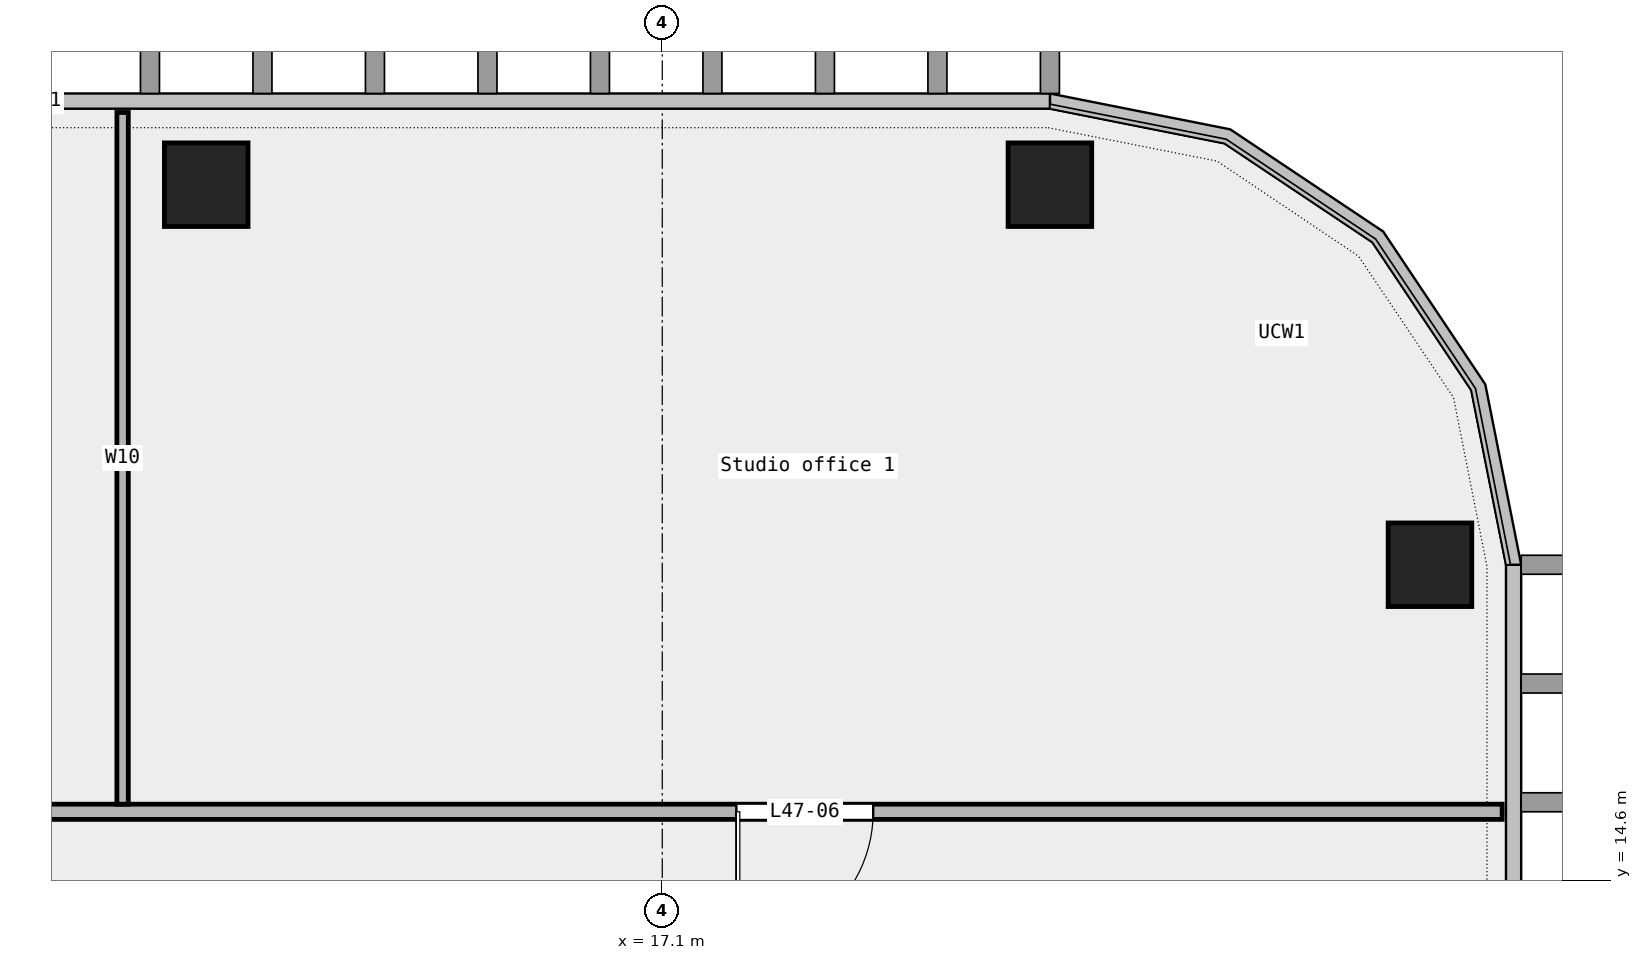
"""IFC4 building model, lengths in metres.
Left out: names, types, materials, properties, quantities, classifications, styles, units other than length and angle.
Written with IfcOpenShell. Run it as: python <this file> out.ifc"""

import sys

from ifc_helpers import new_model, si_unit, direction, frame, frame_2d, origin, origin_2d, place, context, subcontext, project, spatial, rectangle, extrude, element, fill, save


model = new_model("IFC4")
c1 = context("Model", 3, precision=1e-05, world=origin(), true_north=direction((0.0, 1.0)))
c2 = subcontext(c1, "Body", "Model", "MODEL_VIEW")
j1 = project(units=[si_unit("LENGTHUNIT", "METRE"), si_unit("PLANEANGLEUNIT", "RADIAN")], contexts=[c1])
p1 = place(None, origin())
s1 = spatial("IfcSite", under=j1, at=p1, CompositionType="ELEMENT")
p2 = place(p1, origin())
s2 = spatial("IfcBuilding", under=s1, at=p2, CompositionType="ELEMENT")
p3 = place(p2, frame((0.0, 0.0, 223.0)))
s3 = spatial("IfcBuildingStorey", under=s2, at=p3, CompositionType="ELEMENT", Elevation=223.0)
for number, where, z_axis, x_axis in (
    (1, (27.2, 18.75, 0.0), (0.0, 0.0, 1.0), (1.0, 0.0, 0.0)),
    (2, (22.2, 23.75, 0.0), (0.0, 0.0, 1.0), (1.0, 0.0, 0.0)),
    (3, (11.1, 23.75, 0.0), (0.0, 0.0, 1.0), (1.0, 0.0, 0.0)),
):
    element("IfcColumn", number, at=place(p3, frame(where, z_axis=z_axis, x_axis=x_axis)), inside=s3, PredefinedType="COLUMN", context=c2, shape_type="SweptSolid", body=[
        extrude(rectangle(XDim=1.1, YDim=1.1, at=origin_2d()), origin(), (0.0, 0.0, 1.0), 3.6),
    ])
p4 = place(p3, frame((-28.15, 15.5, 0.0), z_axis=(0.0, 0.0, 1.0), x_axis=(1.0, 0.0, 0.0)))
e4 = element("IfcWall", 4, at=p4, inside=s3, PredefinedType="PARTITIONING", context=c2, shape_type="SweptSolid", body=[
    extrude(rectangle(XDim=56.3, YDim=0.2, at=frame_2d((28.15, 0.0))), origin(), (0.0, 0.0, 1.0), 3.6),
])
p5 = place(p4, frame((16.3, 0.0, 0.0)))
e5 = element("IfcOpeningElement", 5, at=p5, cuts=e4, PredefinedType="OPENING", context=c2, shape_type="SweptSolid", body=[
    extrude(rectangle(XDim=1.5, YDim=2.1, at=frame_2d((0.75, 1.05))), frame((0.0, 0.112, 0.0), z_axis=(0.0, -1.0, 0.0), x_axis=(1.0, 0.0, 0.0)), (0.0, 0.0, 1.0), 0.224),
])
p6 = place(p4, frame((46.225, 0.0, 0.0)))
e6 = element("IfcOpeningElement", 6, at=p6, cuts=e4, PredefinedType="OPENING", context=c2, shape_type="SweptSolid", body=[
    extrude(rectangle(XDim=1.8, YDim=2.1, at=frame_2d((0.9, 1.05))), frame((0.0, 0.112, 0.0), z_axis=(0.0, -1.0, 0.0), x_axis=(1.0, 0.0, 0.0)), (0.0, 0.0, 1.0), 0.224),
])
p7 = place(p4, frame((30.18, 0.0, 0.0)))
e7 = element("IfcOpeningElement", 7, at=p7, cuts=e4, PredefinedType="OPENING", context=c2, shape_type="SweptSolid", body=[
    extrude(rectangle(XDim=1.5, YDim=2.1, at=frame_2d((0.75, 1.05))), frame((0.0, 0.112, 0.0), z_axis=(0.0, -1.0, 0.0), x_axis=(1.0, 0.0, 0.0)), (0.0, 0.0, 1.0), 0.224),
])
p8 = place(p4, frame((4.695, 0.0, 0.0)))
e8 = element("IfcOpeningElement", 8, at=p8, cuts=e4, PredefinedType="OPENING", context=c2, shape_type="SweptSolid", body=[
    extrude(rectangle(XDim=1.2, YDim=2.1, at=frame_2d((0.6, 1.05))), frame((0.0, 0.112, 0.0), z_axis=(0.0, -1.0, 0.0), x_axis=(1.0, 0.0, 0.0)), (0.0, 0.0, 1.0), 0.224),
])
p9 = place(p3, frame((10.0, 15.6, 0.0), z_axis=(0.0, 0.0, 1.0), x_axis=(0.0, 1.0, 0.0)))
e9 = element("IfcWall", 9, at=p9, inside=s3, PredefinedType="PARTITIONING", context=c2, shape_type="SweptSolid", body=[
    extrude(rectangle(XDim=9.1, YDim=0.15, at=frame_2d((4.55, 0.0))), origin(), (0.0, 0.0, 1.0), 3.6),
])
p10 = place(p6, origin())
e10 = element("IfcDoor", 10, at=p10, inside=s3, OperationType="DOUBLE_DOOR_SINGLE_SWING", PredefinedType="DOOR", context=c2, shape_type="SweptSolid", body=[
    extrude(rectangle(XDim=1.8, YDim=2.1, at=frame_2d((0.9, 1.05))), frame((0.0, 0.025, 0.0), z_axis=(0.0, -1.0, 0.0), x_axis=(1.0, 0.0, 0.0)), (0.0, 0.0, 1.0), 0.05),
])
fill(e6, e10)
save(model, sys.argv[1])
